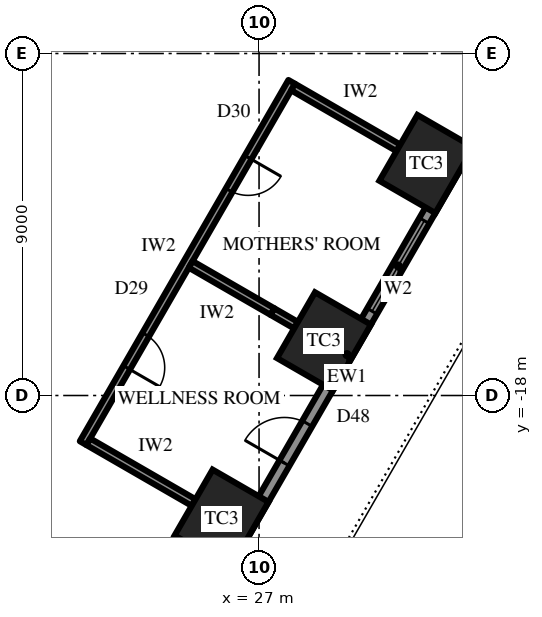
"""IFC4 building model, lengths in metres.
Left out: names, types, materials, properties, quantities, classifications, styles, units other than length and angle.
Written with IfcOpenShell. Run it as: python <this file> out.ifc"""

import sys

from ifc_helpers import new_model, si_unit, direction, frame, frame_2d, origin, origin_2d, place, context, subcontext, project, spatial, rectangle, extrude, element, fill, save


model = new_model("IFC4")
c1 = context("Model", 3, precision=1e-05, world=origin(), true_north=direction((0.0, 1.0)))
c2 = subcontext(c1, "Body", "Model", "MODEL_VIEW")
j1 = project(units=[si_unit("LENGTHUNIT", "METRE"), si_unit("PLANEANGLEUNIT", "RADIAN")], contexts=[c1])
p1 = place(None, origin())
s1 = spatial("IfcSite", under=j1, at=p1, CompositionType="ELEMENT")
p2 = place(p1, origin())
s2 = spatial("IfcBuilding", under=s1, at=p2, CompositionType="ELEMENT")
p3 = place(p2, frame((0.0, 0.0, 82.3)))
s3 = spatial("IfcBuildingStorey", under=s2, at=p3, CompositionType="ELEMENT", Elevation=82.3)
for number, where, z_axis, x_axis in (
    (1, (26.014, -21.242, 0.0), (0.0, 0.0, 1.0), (0.5, 0.866, 0.0)),
    (2, (28.709, -16.575, 0.0), (0.0, 0.0, 1.0), (0.5, 0.866, 0.0)),
    (3, (31.403, -11.908, 0.0), (0.0, 0.0, 1.0), (0.5, 0.866, 0.0)),
):
    element("IfcColumn", number, at=place(p3, frame(where, z_axis=z_axis, x_axis=x_axis)), inside=s3, PredefinedType="COLUMN", context=c2, shape_type="SweptSolid", body=[
        extrude(rectangle(XDim=2.0, YDim=1.7, at=origin_2d()), origin(), (0.0, 0.0, 1.0), 4.2),
    ])
p4 = place(p3, frame((21.232, -30.925, 0.0), z_axis=(0.0, 0.0, 1.0), x_axis=(0.499999163675, 0.866025886636, 0.0)))
e4 = element("IfcWall", 4, at=p4, inside=s3, PredefinedType="SOLIDWALL", context=c2, shape_type="SweptSolid", body=[
    extrude(rectangle(XDim=32.332, YDim=0.3, at=frame_2d((16.166, 0.0))), origin(), (0.0, 0.0, 1.0), 2.7),
])
p5 = place(p4, frame((1.319, 0.0, 0.6)))
e5 = element("IfcOpeningElement", 5, at=p5, cuts=e4, PredefinedType="OPENING", context=c2, shape_type="SweptSolid", body=[
    extrude(rectangle(XDim=2.75, YDim=1.85, at=frame_2d((1.375, 0.925))), frame((0.0, 0.16, 0.0), z_axis=(0.0, -1.0, 0.0), x_axis=(1.0, 0.0, 0.0)), (0.0, 0.0, 1.0), 0.32),
])
p6 = place(p4, frame((6.708, 0.0, 0.6)))
e6 = element("IfcOpeningElement", 6, at=p6, cuts=e4, PredefinedType="OPENING", context=c2, shape_type="SweptSolid", body=[
    extrude(rectangle(XDim=2.75, YDim=1.85, at=frame_2d((1.375, 0.925))), frame((0.0, 0.16, 0.0), z_axis=(0.0, -1.0, 0.0), x_axis=(1.0, 0.0, 0.0)), (0.0, 0.0, 1.0), 0.32),
])
p7 = place(p4, frame((12.872, 0.0, 0.0)))
e7 = element("IfcOpeningElement", 7, at=p7, cuts=e4, PredefinedType="OPENING", context=c2, shape_type="SweptSolid", body=[
    extrude(rectangle(XDim=1.2, YDim=2.4, at=frame_2d((0.6, 1.2))), frame((0.0, 0.16, 0.0), z_axis=(0.0, -1.0, 0.0), x_axis=(1.0, 0.0, 0.0)), (0.0, 0.0, 1.0), 0.32),
])
p8 = place(p4, frame((17.485, 0.0, 0.6)))
e8 = element("IfcOpeningElement", 8, at=p8, cuts=e4, PredefinedType="OPENING", context=c2, shape_type="SweptSolid", body=[
    extrude(rectangle(XDim=2.75, YDim=1.85, at=frame_2d((1.375, 0.925))), frame((0.0, 0.16, 0.0), z_axis=(0.0, -1.0, 0.0), x_axis=(1.0, 0.0, 0.0)), (0.0, 0.0, 1.0), 0.32),
])
p9 = place(p4, frame((22.874, 0.0, 0.6)))
e9 = element("IfcOpeningElement", 9, at=p9, cuts=e4, PredefinedType="OPENING", context=c2, shape_type="SweptSolid", body=[
    extrude(rectangle(XDim=2.75, YDim=1.85, at=frame_2d((1.375, 0.925))), frame((0.0, 0.16, 0.0), z_axis=(0.0, -1.0, 0.0), x_axis=(1.0, 0.0, 0.0)), (0.0, 0.0, 1.0), 0.32),
])
p10 = place(p4, frame((28.262, 0.0, 0.6)))
e10 = element("IfcOpeningElement", 10, at=p10, cuts=e4, PredefinedType="OPENING", context=c2, shape_type="SweptSolid", body=[
    extrude(rectangle(XDim=2.75, YDim=1.85, at=frame_2d((1.375, 0.925))), frame((0.0, 0.16, 0.0), z_axis=(0.0, -1.0, 0.0), x_axis=(1.0, 0.0, 0.0)), (0.0, 0.0, 1.0), 0.32),
])
p11 = place(p3, frame((22.37, -19.253, 0.0), z_axis=(0.0, 0.0, 1.0), x_axis=(0.500018936051, 0.866014470774, 0.0)))
e11 = element("IfcWall", 11, at=p11, inside=s3, PredefinedType="PARTITIONING", context=c2, shape_type="SweptSolid", body=[
    extrude(rectangle(XDim=10.977, YDim=0.2, at=frame_2d((5.489, 0.0))), origin(), (0.0, 0.0, 1.0), 4.0),
])
p12 = place(p11, frame((2.294, 0.0, 0.0)))
e12 = element("IfcOpeningElement", 12, at=p12, cuts=e11, PredefinedType="OPENING", context=c2, shape_type="SweptSolid", body=[
    extrude(rectangle(XDim=1.0, YDim=2.2, at=frame_2d((0.5, 1.1))), frame((0.0, 0.11, 0.0), z_axis=(0.0, -1.0, 0.0), x_axis=(1.0, 0.0, 0.0)), (0.0, 0.0, 1.0), 0.22),
])
p13 = place(p11, frame((7.683, 0.0, 0.0)))
e13 = element("IfcOpeningElement", 13, at=p13, cuts=e11, PredefinedType="OPENING", context=c2, shape_type="SweptSolid", body=[
    extrude(rectangle(XDim=1.0, YDim=2.2, at=frame_2d((0.5, 1.1))), frame((0.0, 0.11, 0.0), z_axis=(0.0, -1.0, 0.0), x_axis=(1.0, 0.0, 0.0)), (0.0, 0.0, 1.0), 0.22),
])
p14 = place(p3, frame((22.507, -19.217, 0.0), z_axis=(0.0, 0.0, 1.0), x_axis=(0.866008981251, -0.500028443584, 0.0)))
e14 = element("IfcWall", 14, at=p14, inside=s3, PredefinedType="PARTITIONING", context=c2, shape_type="SweptSolid", body=[
    extrude(rectangle(XDim=3.2, YDim=0.2, at=frame_2d((1.6, 0.0))), origin(), (0.0, 0.0, 1.0), 2.992),
])
p15 = place(p3, frame((25.201, -14.55, 0.0), z_axis=(0.0, 0.0, 1.0), x_axis=(0.866020232408, -0.500008956979, 0.0)))
e15 = element("IfcWall", 15, at=p15, inside=s3, PredefinedType="PARTITIONING", context=c2, shape_type="SweptSolid", body=[
    extrude(rectangle(XDim=2.483, YDim=0.2, at=frame_2d((1.242, 0.0))), origin(), (0.0, 0.0, 1.0), 4.0),
])
p16 = place(p3, frame((27.352, -15.792, 0.0), z_axis=(0.0, 0.0, 1.0), x_axis=(0.866117509073, -0.499840435016, 0.0)))
e16 = element("IfcWall", 16, at=p16, inside=s3, PredefinedType="PARTITIONING", context=c2, shape_type="SweptSolid", body=[
    extrude(rectangle(XDim=0.717, YDim=0.2, at=frame_2d((0.358, 0.0))), origin(), (0.0, 0.0, 1.0), 2.992),
])
p17 = place(p3, frame((27.896, -9.883, 0.0), z_axis=(0.0, 0.0, 1.0), x_axis=(0.866008981251, -0.500028443584, 0.0)))
e17 = element("IfcWall", 17, at=p17, inside=s3, PredefinedType="PARTITIONING", context=c2, shape_type="SweptSolid", body=[
    extrude(rectangle(XDim=3.2, YDim=0.2, at=frame_2d((1.6, 0.0))), origin(), (0.0, 0.0, 1.0), 2.944),
])
p18 = place(p7, origin())
e18 = element("IfcDoor", 18, at=p18, inside=s3, OperationType="SINGLE_SWING_RIGHT", PredefinedType="DOOR", context=c2, shape_type="SweptSolid", body=[
    extrude(rectangle(XDim=1.2, YDim=2.4, at=frame_2d((0.6, 1.2))), frame((0.0, 0.025, 0.0), z_axis=(0.0, -1.0, 0.0), x_axis=(1.0, 0.0, 0.0)), (0.0, 0.0, 1.0), 0.05),
])
fill(e7, e18)
p19 = place(p8, origin())
e19 = element("IfcWindow", 19, at=p19, inside=s3, PartitioningType="SINGLE_PANEL", PredefinedType="WINDOW", context=c2, shape_type="SweptSolid", body=[
    extrude(rectangle(XDim=2.75, YDim=1.85, at=frame_2d((1.375, 0.925))), frame((0.0, 0.03, 0.0), z_axis=(0.0, -1.0, 0.0), x_axis=(1.0, 0.0, 0.0)), (0.0, 0.0, 1.0), 0.06),
])
fill(e8, e19)
p20 = place(p12, frame((1.0, 0.0, 0.0), z_axis=(0.0, 0.0, 1.0), x_axis=(-1.0, 0.0, 0.0)))
e20 = element("IfcDoor", 20, at=p20, inside=s3, OperationType="SINGLE_SWING_LEFT", PredefinedType="DOOR", context=c2, shape_type="SweptSolid", body=[
    extrude(rectangle(XDim=1.0, YDim=2.2, at=frame_2d((0.5, 1.1))), frame((0.0, 0.025, 0.0), z_axis=(0.0, -1.0, 0.0), x_axis=(1.0, 0.0, 0.0)), (0.0, 0.0, 1.0), 0.05),
])
fill(e12, e20)
p21 = place(p13, frame((1.0, 0.0, 0.0), z_axis=(0.0, 0.0, 1.0), x_axis=(-1.0, 0.0, 0.0)))
e21 = element("IfcDoor", 21, at=p21, inside=s3, OperationType="SINGLE_SWING_RIGHT", PredefinedType="DOOR", context=c2, shape_type="SweptSolid", body=[
    extrude(rectangle(XDim=1.0, YDim=2.2, at=frame_2d((0.5, 1.1))), frame((0.0, 0.025, 0.0), z_axis=(0.0, -1.0, 0.0), x_axis=(1.0, 0.0, 0.0)), (0.0, 0.0, 1.0), 0.05),
])
fill(e13, e21)
save(model, sys.argv[1])
